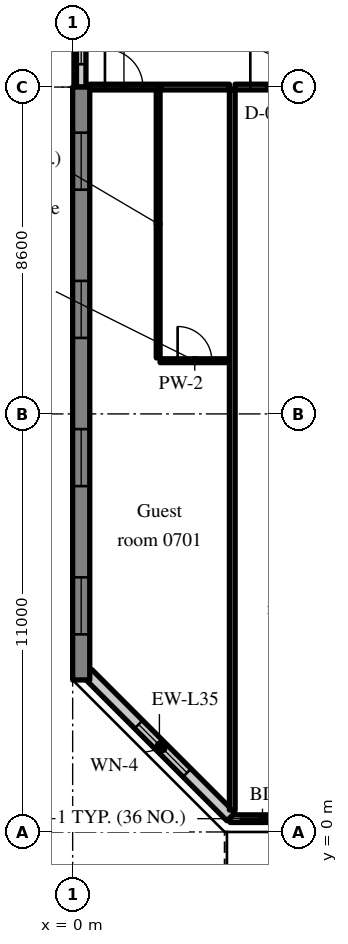
"""IFC4 building model, lengths in metres.
Left out: names, types, materials, properties, quantities, classifications, styles, units other than length and angle.
Written with IfcOpenShell. Run it as: python <this file> out.ifc"""

import sys

from ifc_helpers import new_model, si_unit, direction, frame, frame_2d, origin, place, context, subcontext, project, spatial, rectangle, extrude, source, transform, mapped, element, fill, save


model = new_model("IFC4")
c1 = context("Model", 3, precision=1e-05, world=origin(), true_north=direction((0.0, 1.0)))
c2 = subcontext(c1, "Body", "Model", "MODEL_VIEW")
j1 = project(units=[si_unit("LENGTHUNIT", "METRE"), si_unit("PLANEANGLEUNIT", "RADIAN")], contexts=[c1])
p1 = place(None, origin())
s1 = spatial("IfcSite", under=j1, at=p1, CompositionType="ELEMENT")
p2 = place(p1, origin())
s2 = spatial("IfcBuilding", under=s1, at=p2, CompositionType="ELEMENT")
p3 = place(p2, frame((0.0, 0.0, 35.4)))
s3 = spatial("IfcBuildingStorey", under=s2, at=p3, CompositionType="ELEMENT", Elevation=35.4)
m1 = source(origin(), c2, "Body", "SweptSolid", [
    extrude(rectangle(XDim=15.6, YDim=0.45, at=frame_2d((7.8, 0.0))), origin(), (0.0, 0.0, 1.0), 3.52),
])
p4 = place(p3, frame((0.225, 4.0, 0.0), z_axis=(0.0, 0.0, 1.0), x_axis=(0.0, 1.0, 0.0)))
e1 = element("IfcWall", 1, at=p4, inside=s3, PredefinedType="SHEAR", context=c2, shape_type="MappedRepresentation", body=[
    mapped(m1, transform((0.0, 0.0, 0.0), scale=1.0)),
])
m2 = source(origin(), c2, "Body", "SweptSolid", [
    extrude(rectangle(XDim=1.5, YDim=1.5, at=frame_2d((0.75, 0.75))), frame((0.0, 0.235, 0.0), z_axis=(0.0, -1.0, 0.0), x_axis=(1.0, 0.0, 0.0)), (0.0, 0.0, 1.0), 0.47),
])
p5 = place(p4, frame((1.2, 0.0, 0.9)))
e2 = element("IfcOpeningElement", 2, at=p5, cuts=e1, PredefinedType="OPENING", context=c2, shape_type="MappedRepresentation", body=[
    mapped(m2, transform((0.0, 0.0, 0.0), scale=1.0)),
])
p6 = place(p4, frame((5.1, 0.0, 0.9)))
e3 = element("IfcOpeningElement", 3, at=p6, cuts=e1, PredefinedType="OPENING", context=c2, shape_type="MappedRepresentation", body=[
    mapped(m2, transform((0.0, 0.0, 0.0), scale=1.0)),
])
p7 = place(p4, frame((9.0, 0.0, 0.9)))
e4 = element("IfcOpeningElement", 4, at=p7, cuts=e1, PredefinedType="OPENING", context=c2, shape_type="MappedRepresentation", body=[
    mapped(m2, transform((0.0, 0.0, 0.0), scale=1.0)),
])
p8 = place(p4, frame((12.9, 0.0, 0.9)))
e5 = element("IfcOpeningElement", 5, at=p8, cuts=e1, PredefinedType="OPENING", context=c2, shape_type="MappedRepresentation", body=[
    mapped(m2, transform((0.0, 0.0, 0.0), scale=1.0)),
])
m3 = source(origin(), c2, "Body", "SweptSolid", [
    extrude(rectangle(XDim=4.03, YDim=0.2, at=frame_2d((2.015, 0.0))), origin(), (0.0, 0.0, 1.0), 2.77),
])
p9 = place(p3, frame((4.145, 0.35, 0.0), z_axis=(0.0, 0.0, 1.0), x_axis=(1.0, 0.0, 0.0)))
e6 = element("IfcWall", 6, at=p9, inside=s3, PredefinedType="SOLIDWALL", context=c2, shape_type="MappedRepresentation", body=[
    mapped(m3, transform((0.0, 0.0, 0.0), scale=1.0)),
])
m4 = source(origin(), c2, "Body", "SweptSolid", [
    extrude(rectangle(XDim=1.2, YDim=2.4, at=frame_2d((0.6, 1.2))), frame((0.0, 0.11, 0.0), z_axis=(0.0, -1.0, 0.0), x_axis=(1.0, 0.0, 0.0)), (0.0, 0.0, 1.0), 0.22),
])
p10 = place(p9, frame((0.25, 0.0, 0.0)))
e7 = element("IfcOpeningElement", 7, at=p10, cuts=e6, PredefinedType="OPENING", context=c2, shape_type="MappedRepresentation", body=[
    mapped(m4, transform((0.0, 0.0, 0.0), scale=1.0)),
])
m5 = source(origin(), c2, "Body", "SweptSolid", [
    extrude(rectangle(XDim=1.5, YDim=1.5, at=frame_2d((0.75, 0.75))), frame((0.0, 0.11, 0.0), z_axis=(0.0, -1.0, 0.0), x_axis=(1.0, 0.0, 0.0)), (0.0, 0.0, 1.0), 0.22),
])
p11 = place(p9, frame((2.28, 0.0, 0.9)))
e8 = element("IfcOpeningElement", 8, at=p11, cuts=e6, PredefinedType="OPENING", context=c2, shape_type="MappedRepresentation", body=[
    mapped(m5, transform((0.0, 0.0, 0.0), scale=1.0)),
])
m6 = source(origin(), c2, "Body", "SweptSolid", [
    extrude(rectangle(XDim=5.326, YDim=0.3, at=frame_2d((2.663, 0.0))), origin(), (0.0, 0.0, 1.0), 3.52),
])
p12 = place(p3, frame((0.4, 4.166, 0.0), z_axis=(0.0, 0.0, 1.0), x_axis=(0.707106781187, -0.707106781187, 0.0)))
e9 = element("IfcWall", 9, at=p12, inside=s3, PredefinedType="SOLIDWALL", context=c2, shape_type="MappedRepresentation", body=[
    mapped(m6, transform((0.0, 0.0, 0.0), scale=1.0)),
])
m7 = source(origin(), c2, "Body", "SweptSolid", [
    extrude(rectangle(XDim=1.8, YDim=1.5, at=frame_2d((0.9, 0.75))), frame((0.0, 0.16, 0.0), z_axis=(0.0, -1.0, 0.0), x_axis=(1.0, 0.0, 0.0)), (0.0, 0.0, 1.0), 0.32),
])
p13 = place(p12, frame((1.889, 0.0, 0.9)))
e10 = element("IfcOpeningElement", 10, at=p13, cuts=e9, PredefinedType="OPENING", context=c2, shape_type="MappedRepresentation", body=[
    mapped(m7, transform((0.0, 0.0, 0.0), scale=1.0)),
])
m8 = source(origin(), c2, "Body", "SweptSolid", [
    extrude(rectangle(XDim=2.4, YDim=0.25, at=frame_2d((1.2, 0.0))), origin(), (0.0, 0.0, 1.0), 2.62),
])
p14 = place(p3, frame((0.225, 19.6, 0.0), z_axis=(0.0, 0.0, 1.0), x_axis=(0.0, 1.0, 0.0)))
e11 = element("IfcWall", 11, at=p14, inside=s3, PredefinedType="SOLIDWALL", context=c2, shape_type="MappedRepresentation", body=[
    mapped(m8, transform((0.0, 0.0, 0.0), scale=1.0)),
])
m9 = source(origin(), c2, "Body", "SweptSolid", [
    extrude(rectangle(XDim=1.2, YDim=1.5, at=frame_2d((0.6, 0.75))), frame((0.0, 0.135, 0.0), z_axis=(0.0, -1.0, 0.0), x_axis=(1.0, 0.0, 0.0)), (0.0, 0.0, 1.0), 0.27),
])
p15 = place(p14, frame((0.6, 0.0, 0.9)))
e12 = element("IfcOpeningElement", 12, at=p15, cuts=e11, PredefinedType="OPENING", context=c2, shape_type="MappedRepresentation", body=[
    mapped(m9, transform((0.0, 0.0, 0.0), scale=1.0)),
])
m10 = source(origin(), c2, "Body", "SweptSolid", [
    extrude(rectangle(XDim=7.05, YDim=0.1, at=frame_2d((3.525, 0.0))), origin(), (0.0, 0.0, 1.0), 3.52),
])
p16 = place(p3, frame((2.25, 12.475, 0.0), z_axis=(0.0, 0.0, 1.0), x_axis=(0.0, 1.0, 0.0)))
e13 = element("IfcWall", 13, at=p16, inside=s3, PredefinedType="PARTITIONING", context=c2, shape_type="MappedRepresentation", body=[
    mapped(m10, transform((0.0, 0.0, 0.0), scale=1.0)),
])
m11 = source(origin(), c2, "Body", "SweptSolid", [
    extrude(rectangle(XDim=1.825, YDim=0.1, at=frame_2d((0.913, 0.0))), origin(), (0.0, 0.0, 1.0), 3.52),
])
p17 = place(p3, frame((2.3, 12.4, 0.0), z_axis=(0.0, 0.0, 1.0), x_axis=(1.0, 0.0, 0.0)))
e14 = element("IfcWall", 14, at=p17, inside=s3, PredefinedType="PARTITIONING", context=c2, shape_type="MappedRepresentation", body=[
    mapped(m11, transform((0.0, 0.0, 0.0), scale=1.0)),
])
m12 = source(origin(), c2, "Body", "SweptSolid", [
    extrude(rectangle(XDim=0.9, YDim=2.1, at=frame_2d((0.45, 1.05))), frame((0.0, 0.06, 0.0), z_axis=(0.0, -1.0, 0.0), x_axis=(1.0, 0.0, 0.0)), (0.0, 0.0, 1.0), 0.12),
])
p18 = place(p17, frame((0.462, 0.0, 0.0)))
e15 = element("IfcOpeningElement", 15, at=p18, cuts=e14, PredefinedType="OPENING", context=c2, shape_type="MappedRepresentation", body=[
    mapped(m12, transform((0.0, 0.0, 0.0), scale=1.0)),
])
m13 = source(origin(), c2, "Body", "SweptSolid", [
    extrude(rectangle(XDim=3.675, YDim=0.15, at=frame_2d((1.837, 0.0))), origin(), (0.0, 0.0, 1.0), 2.82),
])
p19 = place(p3, frame((0.45, 19.6, 0.0), z_axis=(0.0, 0.0, 1.0), x_axis=(1.0, 0.0, 0.0)))
e16 = element("IfcWall", 16, at=p19, inside=s3, PredefinedType="PARTITIONING", context=c2, shape_type="MappedRepresentation", body=[
    mapped(m13, transform((0.0, 0.0, 0.0), scale=1.0)),
])
m14 = source(origin(), c2, "Body", "SweptSolid", [
    extrude(rectangle(XDim=1.0, YDim=2.1, at=frame_2d((0.5, 1.05))), frame((0.0, 0.085, 0.0), z_axis=(0.0, -1.0, 0.0), x_axis=(1.0, 0.0, 0.0)), (0.0, 0.0, 1.0), 0.17),
])
p20 = place(p19, frame((0.4, 0.0, 0.0)))
e17 = element("IfcOpeningElement", 17, at=p20, cuts=e16, PredefinedType="OPENING", context=c2, shape_type="MappedRepresentation", body=[
    mapped(m14, transform((0.0, 0.0, 0.0), scale=1.0)),
])
m15 = source(origin(), c2, "Body", "SweptSolid", [
    extrude(rectangle(XDim=3.9, YDim=0.15, at=frame_2d((1.95, 0.0))), origin(), (0.0, 0.0, 1.0), 2.82),
])
p21 = place(p3, frame((4.275, 19.6, 0.0), z_axis=(0.0, 0.0, 1.0), x_axis=(1.0, 0.0, 0.0)))
e18 = element("IfcWall", 18, at=p21, inside=s3, PredefinedType="PARTITIONING", context=c2, shape_type="MappedRepresentation", body=[
    mapped(m15, transform((0.0, 0.0, 0.0), scale=1.0)),
])
p22 = place(p21, frame((0.4, 0.0, 0.0)))
e19 = element("IfcOpeningElement", 19, at=p22, cuts=e18, PredefinedType="OPENING", context=c2, shape_type="MappedRepresentation", body=[
    mapped(m14, transform((0.0, 0.0, 0.0), scale=1.0)),
])
m16 = source(origin(), c2, "Body", "SweptSolid", [
    extrude(rectangle(XDim=18.947, YDim=0.15, at=frame_2d((9.474, 0.0))), origin(), (0.0, 0.0, 1.0), 3.52),
])
p23 = place(p3, frame((4.2, 0.578, 0.0), z_axis=(0.0, 0.0, 1.0), x_axis=(0.0, 1.0, 0.0)))
e20 = element("IfcWall", 20, at=p23, inside=s3, PredefinedType="PARTITIONING", context=c2, shape_type="MappedRepresentation", body=[
    mapped(m16, transform((0.0, 0.0, 0.0), scale=1.0)),
])
m17 = source(origin(), c2, "Body", "SweptSolid", [
    extrude(rectangle(XDim=1.2, YDim=2.4, at=frame_2d((0.6, 1.2))), frame((0.0, 0.025, 0.0), z_axis=(0.0, -1.0, 0.0), x_axis=(1.0, 0.0, 0.0)), (0.0, 0.0, 1.0), 0.05),
])
p24 = place(p10, origin())
e21 = element("IfcDoor", 21, at=p24, inside=s3, OperationType="SLIDING_TO_LEFT", PredefinedType="DOOR", context=c2, shape_type="MappedRepresentation", body=[
    mapped(m17, transform((0.0, 0.0, 0.0), scale=1.0)),
])
fill(e7, e21)
m18 = source(origin(), c2, "Body", "SweptSolid", [
    extrude(rectangle(XDim=1.8, YDim=1.5, at=frame_2d((0.9, 0.75))), frame((0.0, 0.03, 0.0), z_axis=(0.0, -1.0, 0.0), x_axis=(1.0, 0.0, 0.0)), (0.0, 0.0, 1.0), 0.06),
])
p25 = place(p13, origin())
e22 = element("IfcWindow", 22, at=p25, inside=s3, PartitioningType="SINGLE_PANEL", PredefinedType="WINDOW", context=c2, shape_type="MappedRepresentation", body=[
    mapped(m18, transform((0.0, 0.0, 0.0), scale=1.0)),
])
fill(e10, e22)
m19 = source(origin(), c2, "Body", "SweptSolid", [
    extrude(rectangle(XDim=1.5, YDim=1.5, at=frame_2d((0.75, 0.75))), frame((0.0, 0.03, 0.0), z_axis=(0.0, -1.0, 0.0), x_axis=(1.0, 0.0, 0.0)), (0.0, 0.0, 1.0), 0.06),
])
p26 = place(p5, origin())
e23 = element("IfcWindow", 23, at=p26, inside=s3, PartitioningType="SINGLE_PANEL", PredefinedType="WINDOW", context=c2, shape_type="MappedRepresentation", body=[
    mapped(m19, transform((0.0, 0.0, 0.0), scale=1.0)),
])
fill(e2, e23)
p27 = place(p6, origin())
e24 = element("IfcWindow", 24, at=p27, inside=s3, PartitioningType="SINGLE_PANEL", PredefinedType="WINDOW", context=c2, shape_type="MappedRepresentation", body=[
    mapped(m19, transform((0.0, 0.0, 0.0), scale=1.0)),
])
fill(e3, e24)
p28 = place(p7, origin())
e25 = element("IfcWindow", 25, at=p28, inside=s3, PartitioningType="SINGLE_PANEL", PredefinedType="WINDOW", context=c2, shape_type="MappedRepresentation", body=[
    mapped(m19, transform((0.0, 0.0, 0.0), scale=1.0)),
])
fill(e4, e25)
p29 = place(p8, origin())
e26 = element("IfcWindow", 26, at=p29, inside=s3, PartitioningType="SINGLE_PANEL", PredefinedType="WINDOW", context=c2, shape_type="MappedRepresentation", body=[
    mapped(m19, transform((0.0, 0.0, 0.0), scale=1.0)),
])
fill(e5, e26)
m20 = source(origin(), c2, "Body", "SweptSolid", [
    extrude(rectangle(XDim=1.2, YDim=1.5, at=frame_2d((0.6, 0.75))), frame((0.0, 0.03, 0.0), z_axis=(0.0, -1.0, 0.0), x_axis=(1.0, 0.0, 0.0)), (0.0, 0.0, 1.0), 0.06),
])
p30 = place(p15, origin())
e27 = element("IfcWindow", 27, at=p30, inside=s3, PartitioningType="SINGLE_PANEL", PredefinedType="WINDOW", context=c2, shape_type="MappedRepresentation", body=[
    mapped(m20, transform((0.0, 0.0, 0.0), scale=1.0)),
])
fill(e12, e27)
m21 = source(origin(), c2, "Body", "SweptSolid", [
    extrude(rectangle(XDim=0.9, YDim=2.1, at=frame_2d((0.45, 1.05))), frame((0.0, 0.025, 0.0), z_axis=(0.0, -1.0, 0.0), x_axis=(1.0, 0.0, 0.0)), (0.0, 0.0, 1.0), 0.05),
])
p31 = place(p18, origin())
e28 = element("IfcDoor", 28, at=p31, inside=s3, OperationType="SINGLE_SWING_LEFT", PredefinedType="DOOR", context=c2, shape_type="MappedRepresentation", body=[
    mapped(m21, transform((0.0, 0.0, 0.0), scale=1.0)),
])
fill(e15, e28)
m22 = source(origin(), c2, "Body", "SweptSolid", [
    extrude(rectangle(XDim=1.0, YDim=2.1, at=frame_2d((0.5, 1.05))), frame((0.0, 0.025, 0.0), z_axis=(0.0, -1.0, 0.0), x_axis=(1.0, 0.0, 0.0)), (0.0, 0.0, 1.0), 0.05),
])
p32 = place(p20, origin())
e29 = element("IfcDoor", 29, at=p32, inside=s3, OperationType="SINGLE_SWING_LEFT", PredefinedType="DOOR", context=c2, shape_type="MappedRepresentation", body=[
    mapped(m22, transform((0.0, 0.0, 0.0), scale=1.0)),
])
fill(e17, e29)
p33 = place(p22, origin())
e30 = element("IfcDoor", 30, at=p33, inside=s3, OperationType="SINGLE_SWING_LEFT", PredefinedType="DOOR", context=c2, shape_type="MappedRepresentation", body=[
    mapped(m22, transform((0.0, 0.0, 0.0), scale=1.0)),
])
fill(e19, e30)
save(model, sys.argv[1])
